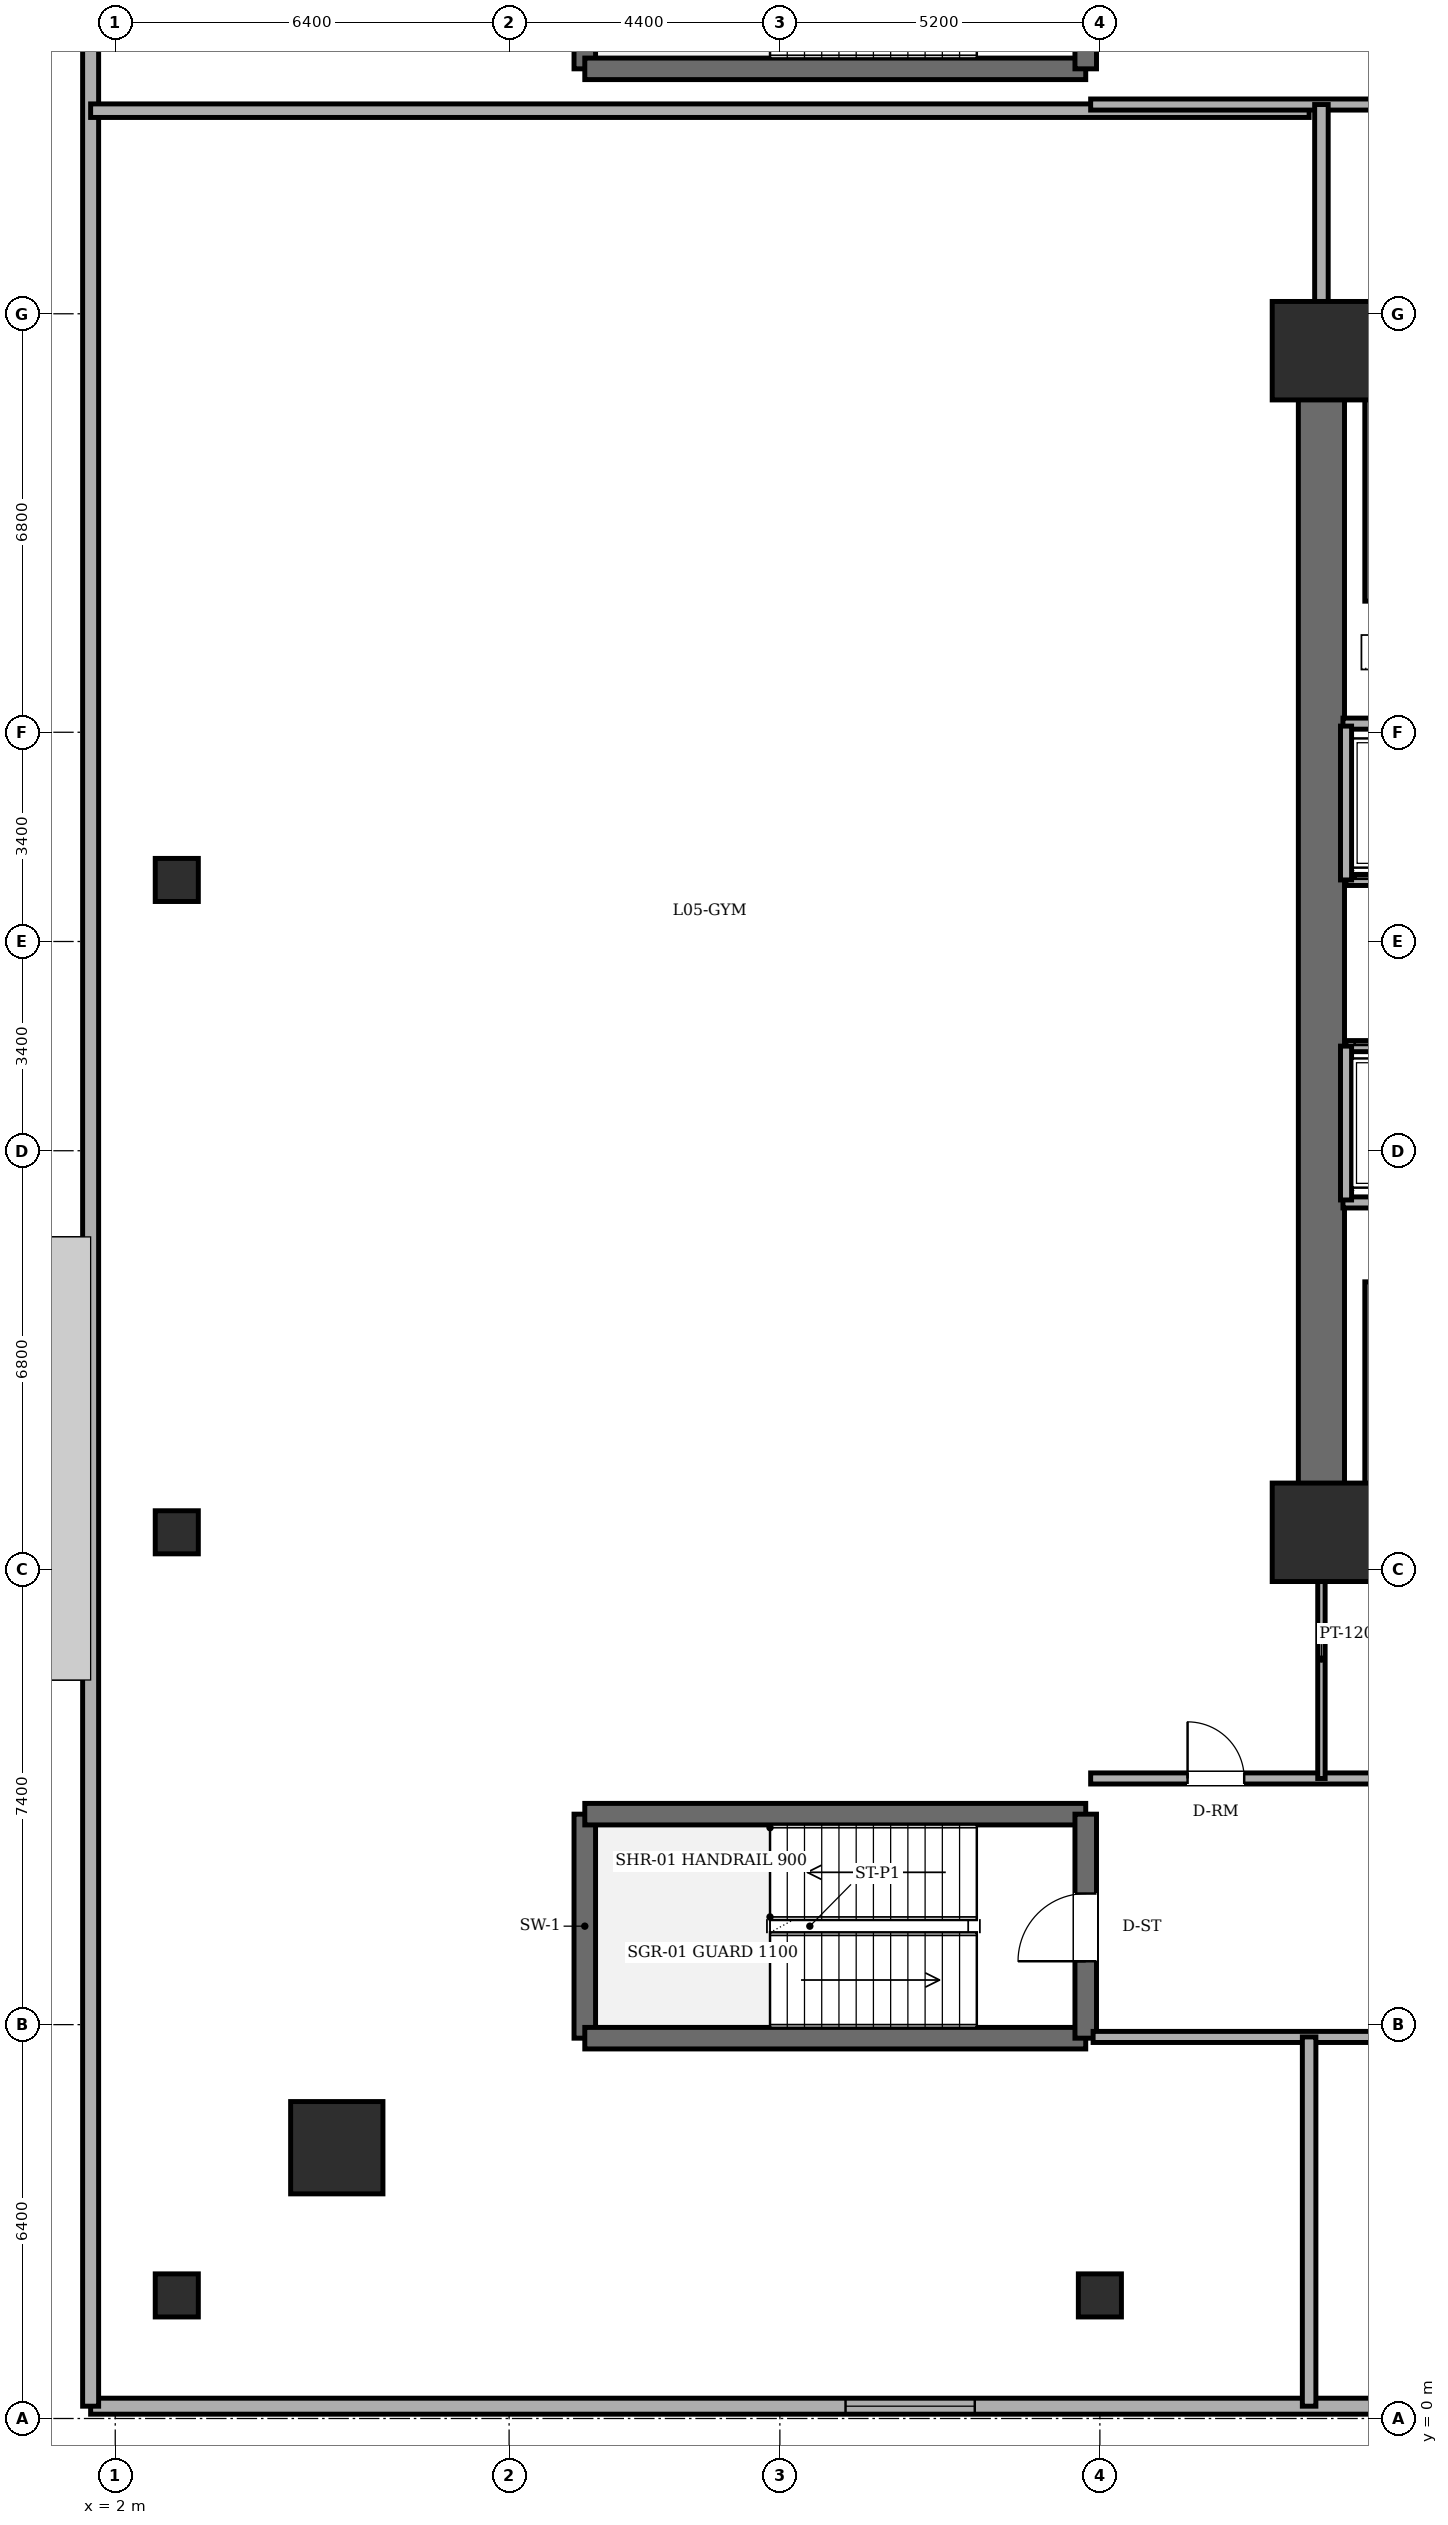
"""IFC4 building model, lengths in metres.
Left out: names, types, materials, properties, quantities, classifications, styles, units other than length and angle.
Written with IfcOpenShell. Run it as: python <this file> out.ifc"""

import sys

from ifc_helpers import new_model, si_unit, direction, frame, frame_2d, origin, origin_2d, place, context, subcontext, project, spatial, rectangle, circle, extrude, element, fill, save


model = new_model("IFC4")
c1 = context("Model", 3, precision=1e-05, world=origin(), true_north=direction((0.0, 1.0)))
c2 = subcontext(c1, "Body", "Model", "MODEL_VIEW")
j1 = project(units=[si_unit("LENGTHUNIT", "METRE"), si_unit("PLANEANGLEUNIT", "RADIAN")], contexts=[c1])
p1 = place(None, origin())
s1 = spatial("IfcSite", under=j1, at=p1, CompositionType="ELEMENT")
p2 = place(p1, origin())
s2 = spatial("IfcBuilding", under=s1, at=p2, CompositionType="ELEMENT")
p3 = place(p2, frame((0.0, 0.0, 19.35)))
s3 = spatial("IfcBuildingStorey", under=s2, at=p3, CompositionType="ELEMENT", Elevation=19.35)
for number, where, z_axis, x_axis in (
    (1, (21.6, 14.4, 0.0), (0.0, 0.0, 1.0), (1.0, 0.0, 0.0)),
    (2, (21.6, 33.6, 0.0), (0.0, 0.0, 1.0), (1.0, 0.0, 0.0)),
):
    element("IfcColumn", number, at=place(p3, frame(where, z_axis=z_axis, x_axis=x_axis)), inside=s3, PredefinedType="COLUMN", context=c2, shape_type="SweptSolid", body=[
        extrude(rectangle(XDim=1.6, YDim=1.6, at=origin_2d()), origin(), (0.0, 0.0, 1.0), 4.65),
    ])
p4 = place(p3, frame((5.6, 4.4, 0.0), z_axis=(0.0, 0.0, 1.0), x_axis=(1.0, 0.0, 0.0)))
e3 = element("IfcColumn", 3, at=p4, inside=s3, PredefinedType="COLUMN", context=c2, shape_type="SweptSolid", body=[
    extrude(circle(Radius=0.75, at=origin_2d()), origin(), (0.0, 0.0, 1.0), 4.65),
])
for number, where, z_axis, x_axis in (
    (4, (3.0, 2.0, 0.0), (0.0, 0.0, 1.0), (1.0, 0.0, 0.0)),
    (5, (18.0, 2.0, 0.0), (0.0, 0.0, 1.0), (1.0, 0.0, 0.0)),
    (6, (3.0, 14.4, 0.0), (0.0, 0.0, 1.0), (1.0, 0.0, 0.0)),
    (7, (3.0, 25.0, 0.0), (0.0, 0.0, 1.0), (1.0, 0.0, 0.0)),
):
    element("IfcColumn", number, at=place(p3, frame(where, z_axis=z_axis, x_axis=x_axis)), inside=s3, PredefinedType="COLUMN", context=c2, shape_type="SweptSolid", body=[
        extrude(rectangle(XDim=0.7, YDim=0.7, at=origin_2d()), origin(), (0.0, 0.0, 1.0), 4.65),
    ])
p5 = place(p3, frame((65.8, 0.2, 0.0), z_axis=(0.0, 0.0, 1.0), x_axis=(-1.0, 0.0, 0.0)))
e8 = element("IfcWall", 8, at=p5, inside=s3, PredefinedType="SOLIDWALL", context=c2, shape_type="SweptSolid", body=[
    extrude(rectangle(XDim=64.2, YDim=0.26, at=frame_2d((32.1, 0.0))), origin(), (0.0, 0.0, 1.0), 4.41),
])
p6 = place(p5, frame((7.85, 0.0, 0.9)))
e9 = element("IfcOpeningElement", 9, at=p6, cuts=e8, PredefinedType="OPENING", context=c2, shape_type="SweptSolid", body=[
    extrude(rectangle(XDim=2.1, YDim=2.0, at=frame_2d((1.05, 1.0))), frame((0.0, 0.14, 0.0), z_axis=(0.0, -1.0, 0.0), x_axis=(1.0, 0.0, 0.0)), (0.0, 0.0, 1.0), 0.28),
])
p7 = place(p5, frame((16.4, 0.0, 0.9)))
e10 = element("IfcOpeningElement", 10, at=p7, cuts=e8, PredefinedType="OPENING", context=c2, shape_type="SweptSolid", body=[
    extrude(rectangle(XDim=2.1, YDim=2.0, at=frame_2d((1.05, 1.0))), frame((0.0, 0.14, 0.0), z_axis=(0.0, -1.0, 0.0), x_axis=(1.0, 0.0, 0.0)), (0.0, 0.0, 1.0), 0.28),
])
p8 = place(p5, frame((31.083, 0.0, 0.9)))
e11 = element("IfcOpeningElement", 11, at=p8, cuts=e8, PredefinedType="OPENING", context=c2, shape_type="SweptSolid", body=[
    extrude(rectangle(XDim=2.1, YDim=2.0, at=frame_2d((1.05, 1.0))), frame((0.0, 0.14, 0.0), z_axis=(0.0, -1.0, 0.0), x_axis=(1.0, 0.0, 0.0)), (0.0, 0.0, 1.0), 0.28),
])
p9 = place(p5, frame((37.217, 0.0, 0.9)))
e12 = element("IfcOpeningElement", 12, at=p9, cuts=e8, PredefinedType="OPENING", context=c2, shape_type="SweptSolid", body=[
    extrude(rectangle(XDim=2.1, YDim=2.0, at=frame_2d((1.05, 1.0))), frame((0.0, 0.14, 0.0), z_axis=(0.0, -1.0, 0.0), x_axis=(1.0, 0.0, 0.0)), (0.0, 0.0, 1.0), 0.28),
])
p10 = place(p5, frame((49.833, 0.0, 0.9)))
e13 = element("IfcOpeningElement", 13, at=p10, cuts=e8, PredefinedType="OPENING", context=c2, shape_type="SweptSolid", body=[
    extrude(rectangle(XDim=2.1, YDim=2.0, at=frame_2d((1.05, 1.0))), frame((0.0, 0.14, 0.0), z_axis=(0.0, -1.0, 0.0), x_axis=(1.0, 0.0, 0.0)), (0.0, 0.0, 1.0), 0.28),
])
p11 = place(p3, frame((1.6, 0.2, 0.0), z_axis=(0.0, 0.0, 1.0), x_axis=(0.0, 1.0, 0.0)))
e14 = element("IfcWall", 14, at=p11, inside=s3, PredefinedType="SOLIDWALL", context=c2, shape_type="SweptSolid", body=[
    extrude(rectangle(XDim=47.6, YDim=0.26, at=frame_2d((23.8, 0.0))), origin(), (0.0, 0.0, 1.0), 4.41),
])
p12 = place(p3, frame((9.63, 6.18, 0.0), z_axis=(0.0, 0.0, 1.0), x_axis=(0.0, 1.0, 0.0)))
e15 = element("IfcWall", 15, at=p12, inside=s3, PredefinedType="SOLIDWALL", context=c2, shape_type="SweptSolid", body=[
    extrude(rectangle(XDim=3.64, YDim=0.35, at=frame_2d((1.82, 0.0))), origin(), (0.0, 0.0, 1.0), 4.65),
])
for number, where, z_axis, x_axis in (
    (16, (9.63, 9.82, 0.0), (0.0, 0.0, 1.0), (1.0, 0.0, 0.0)),
    (17, (17.77, 6.18, 0.0), (0.0, 0.0, 1.0), (-1.0, 0.0, 0.0)),
):
    element("IfcWall", number, at=place(p3, frame(where, z_axis=z_axis, x_axis=x_axis)), inside=s3, PredefinedType="SOLIDWALL", context=c2, shape_type="SweptSolid", body=[
        extrude(rectangle(XDim=8.14, YDim=0.35, at=frame_2d((4.07, 0.0))), origin(), (0.0, 0.0, 1.0), 4.65),
    ])
p13 = place(p3, frame((17.77, 6.18, 0.0), z_axis=(0.0, 0.0, 1.0), x_axis=(0.0, 1.0, 0.0)))
e18 = element("IfcWall", 18, at=p13, inside=s3, PredefinedType="SOLIDWALL", context=c2, shape_type="SweptSolid", body=[
    extrude(rectangle(XDim=3.64, YDim=0.35, at=frame_2d((1.82, 0.0))), origin(), (0.0, 0.0, 1.0), 4.65),
])
p14 = place(p13, frame((1.25, 0.0, 0.0)))
e19 = element("IfcOpeningElement", 19, at=p14, cuts=e18, PredefinedType="OPENING", context=c2, shape_type="SweptSolid", body=[
    extrude(rectangle(XDim=1.1, YDim=2.15, at=frame_2d((0.55, 1.075))), frame((0.0, 0.185, 0.0), z_axis=(0.0, -1.0, 0.0), x_axis=(1.0, 0.0, 0.0)), (0.0, 0.0, 1.0), 0.37),
])
p15 = place(p3, frame((9.63, 38.18, 0.0), z_axis=(0.0, 0.0, 1.0), x_axis=(0.0, 1.0, 0.0)))
e20 = element("IfcWall", 20, at=p15, inside=s3, PredefinedType="SOLIDWALL", context=c2, shape_type="SweptSolid", body=[
    extrude(rectangle(XDim=3.64, YDim=0.35, at=frame_2d((1.82, 0.0))), origin(), (0.0, 0.0, 1.0), 4.65),
])
p16 = place(p3, frame((17.77, 38.18, 0.0), z_axis=(0.0, 0.0, 1.0), x_axis=(-1.0, 0.0, 0.0)))
e21 = element("IfcWall", 21, at=p16, inside=s3, PredefinedType="SOLIDWALL", context=c2, shape_type="SweptSolid", body=[
    extrude(rectangle(XDim=8.14, YDim=0.35, at=frame_2d((4.07, 0.0))), origin(), (0.0, 0.0, 1.0), 4.65),
])
p17 = place(p3, frame((17.77, 38.18, 0.0), z_axis=(0.0, 0.0, 1.0), x_axis=(0.0, 1.0, 0.0)))
e22 = element("IfcWall", 22, at=p17, inside=s3, PredefinedType="SOLIDWALL", context=c2, shape_type="SweptSolid", body=[
    extrude(rectangle(XDim=3.64, YDim=0.35, at=frame_2d((1.82, 0.0))), origin(), (0.0, 0.0, 1.0), 4.65),
])
p18 = place(p17, frame((1.25, 0.0, 0.0)))
e23 = element("IfcOpeningElement", 23, at=p18, cuts=e22, PredefinedType="OPENING", context=c2, shape_type="SweptSolid", body=[
    extrude(rectangle(XDim=1.1, YDim=2.15, at=frame_2d((0.55, 1.075))), frame((0.0, 0.185, 0.0), z_axis=(0.0, -1.0, 0.0), x_axis=(1.0, 0.0, 0.0)), (0.0, 0.0, 1.0), 0.37),
])
p19 = place(p3, frame((21.6, 14.4, 0.0), z_axis=(0.0, 0.0, 1.0), x_axis=(0.0, 1.0, 0.0)))
e24 = element("IfcWall", 24, at=p19, inside=s3, PredefinedType="SHEAR", context=c2, shape_type="SweptSolid", body=[
    extrude(rectangle(XDim=19.2, YDim=0.75, at=frame_2d((9.6, 0.0))), origin(), (0.0, 0.0, 1.0), 4.41),
])
for number, where, z_axis, x_axis in (
    (25, (21.6, 33.6, 0.0), (0.0, 0.0, 1.0), (1.0, 0.0, 0.0)),
    (26, (37.2, 14.4, 0.0), (0.0, 0.0, 1.0), (-1.0, 0.0, 0.0)),
):
    element("IfcWall", number, at=place(p3, frame(where, z_axis=z_axis, x_axis=x_axis)), inside=s3, PredefinedType="SHEAR", context=c2, shape_type="SweptSolid", body=[
        extrude(rectangle(XDim=15.6, YDim=0.75, at=frame_2d((7.8, 0.0))), origin(), (0.0, 0.0, 1.0), 4.41),
    ])
for number, where, z_axis, x_axis in (
    (27, (22.48, 29.53, 0.0), (0.0, 0.0, 1.0), (0.0, 1.0, 0.0)),
    (28, (22.48, 14.89, 0.0), (0.0, 0.0, 1.0), (0.0, 1.0, 0.0)),
):
    element("IfcWall", number, at=place(p3, frame(where, z_axis=z_axis, x_axis=x_axis)), inside=s3, PredefinedType="SOLIDWALL", context=c2, shape_type="SweptSolid", body=[
        extrude(rectangle(XDim=3.58, YDim=0.35, at=frame_2d((1.79, 0.0))), origin(), (0.0, 0.0, 1.0), 4.41),
    ])
p20 = place(p3, frame((21.95, 27.54, 0.0), z_axis=(0.0, 0.0, 1.0), x_axis=(1.0, 0.0, 0.0)))
e29 = element("IfcWall", 29, at=p20, inside=s3, PredefinedType="PARTITIONING", context=c2, shape_type="SweptSolid", body=[
    extrude(rectangle(XDim=10.56, YDim=0.18, at=frame_2d((5.28, 0.0))), origin(), (0.0, 0.0, 1.0), 4.41),
])
p21 = place(p3, frame((21.95, 19.76, 0.0), z_axis=(0.0, 0.0, 1.0), x_axis=(1.0, 0.0, 0.0)))
e30 = element("IfcWall", 30, at=p21, inside=s3, PredefinedType="PARTITIONING", context=c2, shape_type="SweptSolid", body=[
    extrude(rectangle(XDim=14.87, YDim=0.18, at=frame_2d((7.435, 0.0))), origin(), (0.0, 0.0, 1.0), 4.41),
])
p22 = place(p3, frame((24.02, 25.0, 0.0), z_axis=(0.0, 0.0, 1.0), x_axis=(-1.0, 0.0, 0.0)))
e31 = element("IfcWall", 31, at=p22, inside=s3, PredefinedType="PARTITIONING", context=c2, shape_type="SweptSolid", body=[
    extrude(rectangle(XDim=2.02, YDim=0.18, at=frame_2d((1.01, 0.0))), origin(), (0.0, 0.0, 1.0), 4.41),
])
p23 = place(p22, frame((0.435, 0.0, 0.0)))
e32 = element("IfcOpeningElement", 32, at=p23, cuts=e31, PredefinedType="OPENING", context=c2, shape_type="SweptSolid", body=[
    extrude(rectangle(XDim=1.15, YDim=2.2, at=frame_2d((0.575, 1.1))), frame((0.0, 0.1, 0.0), z_axis=(0.0, -1.0, 0.0), x_axis=(1.0, 0.0, 0.0)), (0.0, 0.0, 1.0), 0.2),
])
p24 = place(p3, frame((22.0, 27.5, 0.0), z_axis=(0.0, 0.0, 1.0), x_axis=(0.0, -1.0, 0.0)))
e33 = element("IfcWall", 33, at=p24, inside=s3, PredefinedType="PARTITIONING", context=c2, shape_type="SweptSolid", body=[
    extrude(rectangle(XDim=2.5, YDim=0.18, at=frame_2d((1.25, 0.0))), origin(), (0.0, 0.0, 1.0), 4.41),
])
p25 = place(p3, frame((22.0, 22.3, 0.0), z_axis=(0.0, 0.0, 1.0), x_axis=(1.0, 0.0, 0.0)))
e34 = element("IfcWall", 34, at=p25, inside=s3, PredefinedType="PARTITIONING", context=c2, shape_type="SweptSolid", body=[
    extrude(rectangle(XDim=2.0, YDim=0.18, at=frame_2d((1.0, 0.0))), origin(), (0.0, 0.0, 1.0), 4.41),
])
p26 = place(p25, frame((0.425, 0.0, 0.0)))
e35 = element("IfcOpeningElement", 35, at=p26, cuts=e34, PredefinedType="OPENING", context=c2, shape_type="SweptSolid", body=[
    extrude(rectangle(XDim=1.15, YDim=2.2, at=frame_2d((0.575, 1.1))), frame((0.0, 0.1, 0.0), z_axis=(0.0, -1.0, 0.0), x_axis=(1.0, 0.0, 0.0)), (0.0, 0.0, 1.0), 0.2),
])
p27 = place(p3, frame((22.0, 22.3, 0.0), z_axis=(0.0, 0.0, 1.0), x_axis=(0.0, -1.0, 0.0)))
e36 = element("IfcWall", 36, at=p27, inside=s3, PredefinedType="PARTITIONING", context=c2, shape_type="SweptSolid", body=[
    extrude(rectangle(XDim=2.5, YDim=0.18, at=frame_2d((1.25, 0.0))), origin(), (0.0, 0.0, 1.0), 4.41),
])
p28 = place(p3, frame((17.89, 6.2, 0.0), z_axis=(0.0, 0.0, 1.0), x_axis=(1.0, 0.0, 0.0)))
e37 = element("IfcWall", 37, at=p28, inside=s3, PredefinedType="PARTITIONING", context=c2, shape_type="SweptSolid", body=[
    extrude(rectangle(XDim=21.91, YDim=0.18, at=frame_2d((10.955, 0.0))), origin(), (0.0, 0.0, 1.0), 4.41),
])
p29 = place(p3, frame((17.85, 10.4, 0.0), z_axis=(0.0, 0.0, 1.0), x_axis=(1.0, 0.0, 0.0)))
e38 = element("IfcWall", 38, at=p29, inside=s3, PredefinedType="PARTITIONING", context=c2, shape_type="SweptSolid", body=[
    extrude(rectangle(XDim=19.45, YDim=0.18, at=frame_2d((9.725, 0.0))), origin(), (0.0, 0.0, 1.0), 4.41),
])
p30 = place(p29, frame((1.575, 0.0, 0.0)))
e39 = element("IfcOpeningElement", 39, at=p30, cuts=e38, PredefinedType="OPENING", context=c2, shape_type="SweptSolid", body=[
    extrude(rectangle(XDim=0.92, YDim=2.1, at=frame_2d((0.46, 1.05))), frame((0.0, 0.1, 0.0), z_axis=(0.0, -1.0, 0.0), x_axis=(1.0, 0.0, 0.0)), (0.0, 0.0, 1.0), 0.2),
])
p31 = place(p29, frame((5.6, 0.0, 0.0)))
e40 = element("IfcOpeningElement", 40, at=p31, cuts=e38, PredefinedType="OPENING", context=c2, shape_type="SweptSolid", body=[
    extrude(rectangle(XDim=0.9, YDim=2.1, at=frame_2d((0.45, 1.05))), frame((0.0, 0.1, 0.0), z_axis=(0.0, -1.0, 0.0), x_axis=(1.0, 0.0, 0.0)), (0.0, 0.0, 1.0), 0.2),
])
p32 = place(p29, frame((13.21, 0.0, 0.0)))
e41 = element("IfcOpeningElement", 41, at=p32, cuts=e38, PredefinedType="OPENING", context=c2, shape_type="SweptSolid", body=[
    extrude(rectangle(XDim=0.86, YDim=2.1, at=frame_2d((0.43, 1.05))), frame((0.0, 0.1, 0.0), z_axis=(0.0, -1.0, 0.0), x_axis=(1.0, 0.0, 0.0)), (0.0, 0.0, 1.0), 0.2),
])
p33 = place(p3, frame((1.6, 37.5, 0.0), z_axis=(0.0, 0.0, 1.0), x_axis=(1.0, 0.0, 0.0)))
e42 = element("IfcWall", 42, at=p33, inside=s3, PredefinedType="PARTITIONING", context=c2, shape_type="SweptSolid", body=[
    extrude(rectangle(XDim=19.8, YDim=0.22, at=frame_2d((9.9, 0.0))), origin(), (0.0, 0.0, 1.0), 4.41),
])
p34 = place(p3, frame((17.85, 37.6, 0.0), z_axis=(0.0, 0.0, 1.0), x_axis=(1.0, 0.0, 0.0)))
e43 = element("IfcWall", 43, at=p34, inside=s3, PredefinedType="PARTITIONING", context=c2, shape_type="SweptSolid", body=[
    extrude(rectangle(XDim=19.45, YDim=0.18, at=frame_2d((9.725, 0.0))), origin(), (0.0, 0.0, 1.0), 4.41),
])
p35 = place(p34, frame((7.99, 0.0, 0.0)))
e44 = element("IfcOpeningElement", 44, at=p35, cuts=e43, PredefinedType="OPENING", context=c2, shape_type="SweptSolid", body=[
    extrude(rectangle(XDim=0.92, YDim=2.1, at=frame_2d((0.46, 1.05))), frame((0.0, 0.1, 0.0), z_axis=(0.0, -1.0, 0.0), x_axis=(1.0, 0.0, 0.0)), (0.0, 0.0, 1.0), 0.2),
])
p36 = place(p3, frame((21.4, 0.2, 0.0), z_axis=(0.0, 0.0, 1.0), x_axis=(0.0, 1.0, 0.0)))
e45 = element("IfcWall", 45, at=p36, inside=s3, PredefinedType="PARTITIONING", context=c2, shape_type="SweptSolid", body=[
    extrude(rectangle(XDim=6.0, YDim=0.22, at=frame_2d((3.0, 0.0))), origin(), (0.0, 0.0, 1.0), 4.41),
])
p37 = place(p3, frame((21.6, 10.4, 0.0), z_axis=(0.0, 0.0, 1.0), x_axis=(0.0, 1.0, 0.0)))
e46 = element("IfcWall", 46, at=p37, inside=s3, PredefinedType="PARTITIONING", context=c2, shape_type="SweptSolid", body=[
    extrude(rectangle(XDim=3.88, YDim=0.12, at=frame_2d((1.94, 0.0))), origin(), (0.0, 0.0, 1.0), 3.592),
])
p38 = place(p3, frame((21.6, 33.72, 0.0), z_axis=(0.0, 0.0, 1.0), x_axis=(0.0, 1.0, 0.0)))
e47 = element("IfcWall", 47, at=p38, inside=s3, PredefinedType="PARTITIONING", context=c2, shape_type="SweptSolid", body=[
    extrude(rectangle(XDim=3.88, YDim=0.22, at=frame_2d((1.94, 0.0))), origin(), (0.0, 0.0, 1.0), 3.592),
])
p39 = place(p10, origin())
e48 = element("IfcWindow", 48, at=p39, inside=s3, PartitioningType="DOUBLE_PANEL_VERTICAL", PredefinedType="WINDOW", context=c2, shape_type="SweptSolid", body=[
    extrude(rectangle(XDim=2.1, YDim=2.0, at=frame_2d((1.05, 1.0))), frame((0.0, 0.03, 0.0), z_axis=(0.0, -1.0, 0.0), x_axis=(1.0, 0.0, 0.0)), (0.0, 0.0, 1.0), 0.06),
])
fill(e13, e48)
p40 = place(p14, origin())
e49 = element("IfcDoor", 49, at=p40, inside=s3, OperationType="SINGLE_SWING_LEFT", PredefinedType="DOOR", context=c2, shape_type="SweptSolid", body=[
    extrude(rectangle(XDim=1.1, YDim=2.15, at=frame_2d((0.55, 1.075))), frame((0.0, 0.025, 0.0), z_axis=(0.0, -1.0, 0.0), x_axis=(1.0, 0.0, 0.0)), (0.0, 0.0, 1.0), 0.05),
])
fill(e19, e49)
p41 = place(p30, origin())
e50 = element("IfcDoor", 50, at=p41, inside=s3, OperationType="SINGLE_SWING_LEFT", PredefinedType="DOOR", context=c2, shape_type="SweptSolid", body=[
    extrude(rectangle(XDim=0.92, YDim=2.1, at=frame_2d((0.46, 1.05))), frame((0.0, 0.025, 0.0), z_axis=(0.0, -1.0, 0.0), x_axis=(1.0, 0.0, 0.0)), (0.0, 0.0, 1.0), 0.05),
])
fill(e39, e50)
save(model, sys.argv[1])
